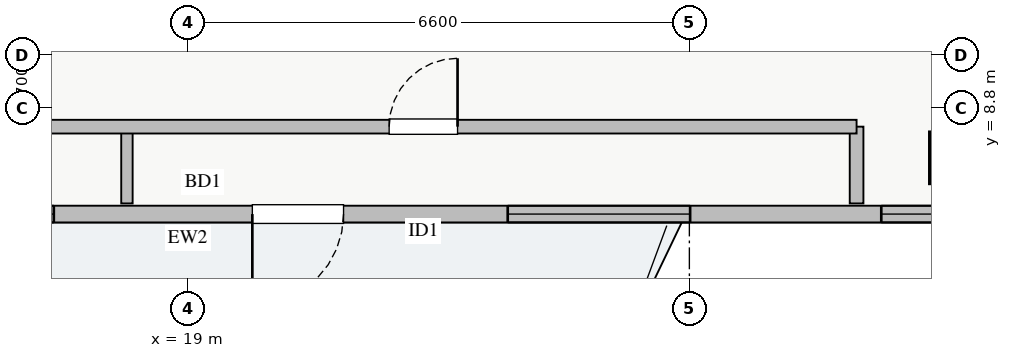
"""IFC4 building model, lengths in metres.
Left out: names, types, materials, properties, quantities, classifications, styles, units other than length and angle.
Written with IfcOpenShell. Run it as: python <this file> out.ifc"""

import sys

from ifc_helpers import new_model, si_unit, direction, frame, frame_2d, origin, origin_2d, place, context, subcontext, project, spatial, rectangle, extrude, source, transform, mapped, element, fill, save


model = new_model("IFC4")
c1 = context("Model", 3, precision=1e-05, world=origin(), true_north=direction((0.0, 1.0)))
c2 = subcontext(c1, "Body", "Model", "MODEL_VIEW")
j1 = project(units=[si_unit("LENGTHUNIT", "METRE"), si_unit("PLANEANGLEUNIT", "RADIAN")], contexts=[c1])
p1 = place(None, origin())
s1 = spatial("IfcSite", under=j1, at=p1, CompositionType="ELEMENT")
p2 = place(p1, origin())
s2 = spatial("IfcBuilding", under=s1, at=p2, CompositionType="ELEMENT")
p3 = place(p2, frame((0.0, 0.0, 253.5)))
s3 = spatial("IfcBuildingStorey", under=s2, at=p3, CompositionType="ELEMENT", Elevation=253.5)
m1 = source(origin(), c2, "Body", "SweptSolid", [
    extrude(rectangle(XDim=0.65, YDim=0.65, at=origin_2d()), origin(), (0.0, 0.0, 1.0), 3.25),
])
p4 = place(p3, frame((29.1, 8.15, 0.0), z_axis=(0.0, 0.0, 1.0), x_axis=(1.0, 0.0, 0.0)))
e1 = element("IfcColumn", 1, at=p4, inside=s3, PredefinedType="COLUMN", context=c2, shape_type="MappedRepresentation", body=[
    mapped(m1, transform((0.0, 0.0, 0.0), x_axis=(1.0, 0.0, 0.0), y_axis=(0.0, 1.0, 0.0), z_axis=(0.0, 0.0, 1.0), scale=1.0)),
])
p5 = place(p3, frame((8.35, 7.41, 0.0), z_axis=(0.0, 0.0, 1.0), x_axis=(1.0, 0.0, 0.0)))
e2 = element("IfcWall", 2, at=p5, inside=s3, PredefinedType="STANDARD", context=c2, shape_type="SweptSolid", body=[
    extrude(rectangle(XDim=21.3, YDim=0.22, at=frame_2d((10.65, 0.0))), origin(), (0.0, 0.0, 1.0), 2.61),
])
p6 = place(p5, frame((11.5, 0.0, 0.0)))
e3 = element("IfcOpeningElement", 3, at=p6, cuts=e2, PredefinedType="OPENING", context=c2, shape_type="SweptSolid", body=[
    extrude(rectangle(XDim=1.2, YDim=2.1, at=frame_2d((0.6, 1.05))), frame((0.0, 0.12, 0.0), z_axis=(0.0, -1.0, 0.0), x_axis=(1.0, 0.0, 0.0)), (0.0, 0.0, 1.0), 0.24),
])
p7 = place(p5, frame((1.463, 0.0, 0.9)))
e4 = element("IfcOpeningElement", 4, at=p7, cuts=e2, PredefinedType="OPENING", context=c2, shape_type="SweptSolid", body=[
    extrude(rectangle(XDim=2.4, YDim=1.48, at=frame_2d((1.2, 0.74))), frame((0.0, 0.12, 0.0), z_axis=(0.0, -1.0, 0.0), x_axis=(1.0, 0.0, 0.0)), (0.0, 0.0, 1.0), 0.24),
])
p8 = place(p5, frame((7.088, 0.0, 0.9)))
e5 = element("IfcOpeningElement", 5, at=p8, cuts=e2, PredefinedType="OPENING", context=c2, shape_type="SweptSolid", body=[
    extrude(rectangle(XDim=1.8, YDim=1.45, at=frame_2d((0.9, 0.725))), frame((0.0, 0.12, 0.0), z_axis=(0.0, -1.0, 0.0), x_axis=(1.0, 0.0, 0.0)), (0.0, 0.0, 1.0), 0.24),
])
p9 = place(p5, frame((19.775, 0.0, 0.9)))
e6 = element("IfcOpeningElement", 6, at=p9, cuts=e2, PredefinedType="OPENING", context=c2, shape_type="SweptSolid", body=[
    extrude(rectangle(XDim=1.2, YDim=1.4, at=frame_2d((0.6, 0.7))), frame((0.0, 0.12, 0.0), z_axis=(0.0, -1.0, 0.0), x_axis=(1.0, 0.0, 0.0)), (0.0, 0.0, 1.0), 0.24),
])
p10 = place(p5, frame((14.86, 0.0, 0.9)))
e7 = element("IfcOpeningElement", 7, at=p10, cuts=e2, PredefinedType="OPENING", context=c2, shape_type="SweptSolid", body=[
    extrude(rectangle(XDim=2.4, YDim=1.5, at=frame_2d((1.2, 0.75))), frame((0.0, 0.12, 0.0), z_axis=(0.0, -1.0, 0.0), x_axis=(1.0, 0.0, 0.0)), (0.0, 0.0, 1.0), 0.24),
])
p11 = place(p3, frame((27.8, 7.55, 0.0), z_axis=(0.0, 0.0, 1.0), x_axis=(0.0, 1.0, 0.0)))
e8 = element("IfcWall", 8, at=p11, inside=s3, PredefinedType="PARTITIONING", context=c2, shape_type="SweptSolid", body=[
    extrude(rectangle(XDim=1.01, YDim=0.18, at=frame_2d((0.505, 0.0))), origin(), (0.0, 0.0, 1.0), 3.07),
])
p12 = place(p3, frame((18.2, 7.55, 0.0), z_axis=(0.0, 0.0, 1.0), x_axis=(0.0, 1.0, 0.0)))
e9 = element("IfcWall", 9, at=p12, inside=s3, PredefinedType="PARTITIONING", context=c2, shape_type="SweptSolid", body=[
    extrude(rectangle(XDim=1.01, YDim=0.15, at=frame_2d((0.505, 0.0))), origin(), (0.0, 0.0, 1.0), 3.07),
])
p13 = place(p3, frame((8.85, 8.56, 0.0), z_axis=(0.0, 0.0, 1.0), x_axis=(1.0, 0.0, 0.0)))
e10 = element("IfcWall", 10, at=p13, inside=s3, PredefinedType="PARTITIONING", context=c2, shape_type="SweptSolid", body=[
    extrude(rectangle(XDim=18.95, YDim=0.18, at=frame_2d((9.475, 0.0))), origin(), (0.0, 0.0, 1.0), 3.07),
])
p14 = place(p13, frame((4.2, 0.0, 0.0)))
e11 = element("IfcOpeningElement", 11, at=p14, cuts=e10, PredefinedType="OPENING", context=c2, shape_type="SweptSolid", body=[
    extrude(rectangle(XDim=0.9, YDim=2.05, at=frame_2d((0.45, 1.025))), frame((0.0, 0.1, 0.0), z_axis=(0.0, -1.0, 0.0), x_axis=(1.0, 0.0, 0.0)), (0.0, 0.0, 1.0), 0.2),
])
p15 = place(p13, frame((12.8, 0.0, 0.0)))
e12 = element("IfcOpeningElement", 12, at=p15, cuts=e10, PredefinedType="OPENING", context=c2, shape_type="SweptSolid", body=[
    extrude(rectangle(XDim=0.9, YDim=2.05, at=frame_2d((0.45, 1.025))), frame((0.0, 0.1, 0.0), z_axis=(0.0, -1.0, 0.0), x_axis=(1.0, 0.0, 0.0)), (0.0, 0.0, 1.0), 0.2),
])
m2 = source(origin(), c2, "Body", "SweptSolid", [
    extrude(rectangle(XDim=1.2, YDim=2.1, at=frame_2d((0.6, 1.05))), frame((0.0, 0.025, 0.0), z_axis=(0.0, -1.0, 0.0), x_axis=(1.0, 0.0, 0.0)), (0.0, 0.0, 1.0), 0.05),
])
p16 = place(p6, frame((1.2, 0.0, 0.0), z_axis=(0.0, 0.0, 1.0), x_axis=(-1.0, 0.0, 0.0)))
e13 = element("IfcDoor", 13, at=p16, inside=s3, OperationType="SINGLE_SWING_LEFT", PredefinedType="DOOR", context=c2, shape_type="MappedRepresentation", body=[
    mapped(m2, transform((0.0, 0.0, 0.0), x_axis=(1.0, 0.0, 0.0), y_axis=(0.0, 1.0, 0.0), z_axis=(0.0, 0.0, 1.0), scale=1.0)),
])
fill(e3, e13)
m3 = source(origin(), c2, "Body", "SweptSolid", [
    extrude(rectangle(XDim=1.8, YDim=1.45, at=frame_2d((0.9, 0.725))), frame((0.0, 0.03, 0.0), z_axis=(0.0, -1.0, 0.0), x_axis=(1.0, 0.0, 0.0)), (0.0, 0.0, 1.0), 0.06),
])
p17 = place(p8, origin())
e14 = element("IfcWindow", 14, at=p17, inside=s3, PartitioningType="DOUBLE_PANEL_VERTICAL", PredefinedType="WINDOW", context=c2, shape_type="MappedRepresentation", body=[
    mapped(m3, transform((0.0, 0.0, 0.0), x_axis=(1.0, 0.0, 0.0), y_axis=(0.0, 1.0, 0.0), z_axis=(0.0, 0.0, 1.0), scale=1.0)),
])
fill(e5, e14)
m4 = source(origin(), c2, "Body", "SweptSolid", [
    extrude(rectangle(XDim=1.2, YDim=1.4, at=frame_2d((0.6, 0.7))), frame((0.0, 0.03, 0.0), z_axis=(0.0, -1.0, 0.0), x_axis=(1.0, 0.0, 0.0)), (0.0, 0.0, 1.0), 0.06),
])
p18 = place(p9, origin())
e15 = element("IfcWindow", 15, at=p18, inside=s3, PartitioningType="TRIPLE_PANEL_VERTICAL", PredefinedType="WINDOW", context=c2, shape_type="MappedRepresentation", body=[
    mapped(m4, transform((0.0, 0.0, 0.0), x_axis=(1.0, 0.0, 0.0), y_axis=(0.0, 1.0, 0.0), z_axis=(0.0, 0.0, 1.0), scale=1.0)),
])
fill(e6, e15)
m5 = source(origin(), c2, "Body", "SweptSolid", [
    extrude(rectangle(XDim=0.9, YDim=2.05, at=frame_2d((0.45, 1.025))), frame((0.0, 0.025, 0.0), z_axis=(0.0, -1.0, 0.0), x_axis=(1.0, 0.0, 0.0)), (0.0, 0.0, 1.0), 0.05),
])
p19 = place(p15, origin())
e16 = element("IfcDoor", 16, at=p19, inside=s3, OperationType="SINGLE_SWING_RIGHT", PredefinedType="DOOR", context=c2, shape_type="MappedRepresentation", body=[
    mapped(m5, transform((0.0, 0.0, 0.0), x_axis=(1.0, 0.0, 0.0), y_axis=(0.0, 1.0, 0.0), z_axis=(0.0, 0.0, 1.0), scale=1.0)),
])
fill(e12, e16)
m6 = source(origin(), c2, "Body", "SweptSolid", [
    extrude(rectangle(XDim=2.4, YDim=1.5, at=frame_2d((1.2, 0.75))), frame((0.0, 0.03, 0.0), z_axis=(0.0, -1.0, 0.0), x_axis=(1.0, 0.0, 0.0)), (0.0, 0.0, 1.0), 0.06),
])
p20 = place(p10, origin())
e17 = element("IfcWindow", 17, at=p20, inside=s3, PartitioningType="TRIPLE_PANEL_VERTICAL", PredefinedType="WINDOW", context=c2, shape_type="MappedRepresentation", body=[
    mapped(m6, transform((0.0, 0.0, 0.0), x_axis=(1.0, 0.0, 0.0), y_axis=(0.0, 1.0, 0.0), z_axis=(0.0, 0.0, 1.0), scale=1.0)),
])
fill(e7, e17)
save(model, sys.argv[1])
